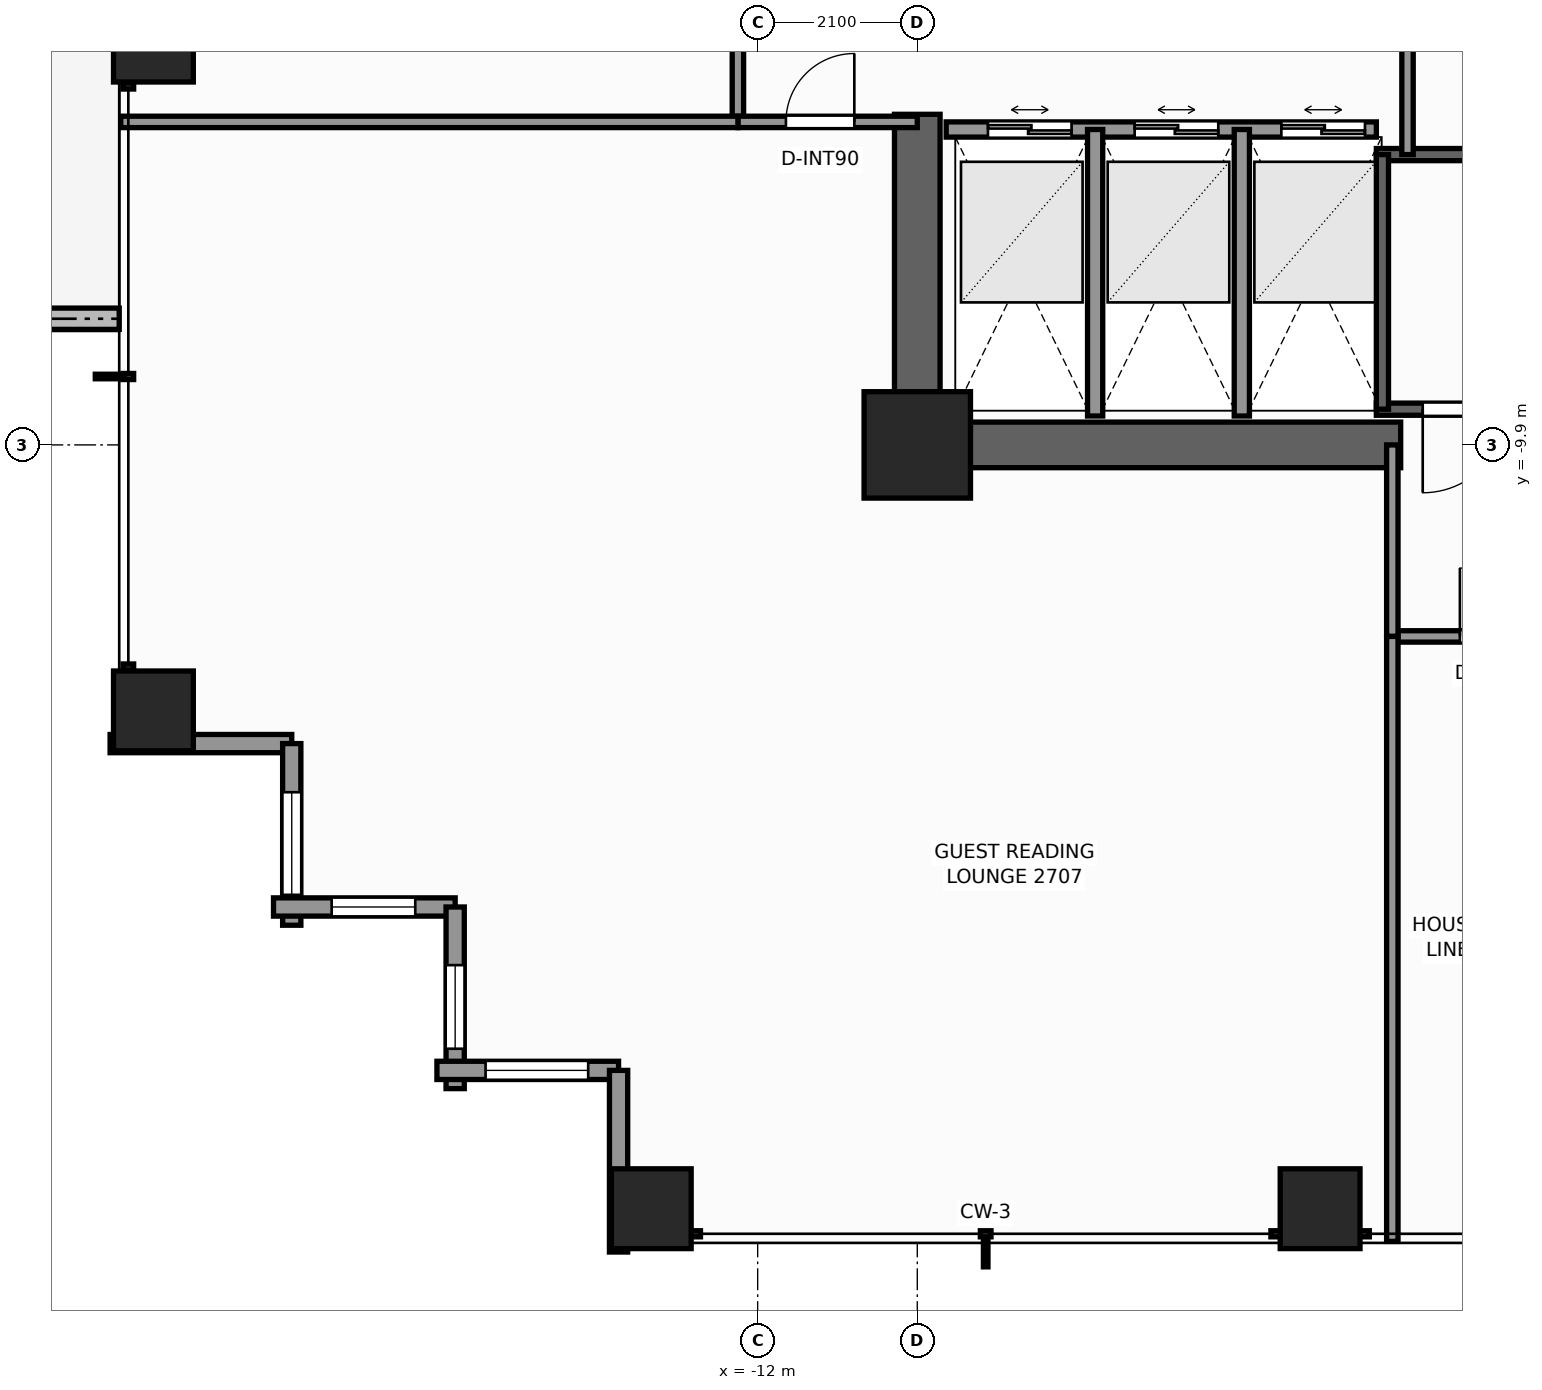
"""IFC4 building model, lengths in metres.
Left out: names, types, materials, properties, quantities, classifications, styles, units other than length and angle.
Written with IfcOpenShell. Run it as: python <this file> out.ifc"""

import sys

from ifc_helpers import new_model, si_unit, direction, frame, frame_2d, origin, origin_2d, place, context, subcontext, project, spatial, rectangle, extrude, element, fill, save


model = new_model("IFC4")
c1 = context("Model", 3, precision=1e-05, world=origin(), true_north=direction((0.0, 1.0)))
c2 = subcontext(c1, "Body", "Model", "MODEL_VIEW")
j1 = project(units=[si_unit("LENGTHUNIT", "METRE"), si_unit("PLANEANGLEUNIT", "RADIAN")], contexts=[c1])
p1 = place(None, origin())
s1 = spatial("IfcSite", under=j1, at=p1, CompositionType="ELEMENT")
p2 = place(p1, origin())
s2 = spatial("IfcBuilding", under=s1, at=p2, CompositionType="ELEMENT")
p3 = place(p2, frame((0.0, 0.0, 95.3)))
s3 = spatial("IfcBuildingStorey", under=s2, at=p3, CompositionType="ELEMENT", Elevation=95.3)
p4 = place(p3, frame((-3.54, -9.9, 0.0), z_axis=(0.0, 0.0, 1.0), x_axis=(-1.0, 0.0, 0.0)))
e1 = element("IfcWall", 1, at=p4, inside=s3, PredefinedType="SHEAR", context=c2, shape_type="SweptSolid", body=[
    extrude(rectangle(XDim=6.66, YDim=0.6, at=frame_2d((3.33, 0.0))), origin(), (0.0, 0.0, 1.0), 3.3),
])
p5 = place(p3, frame((-9.9, -9.6, 0.0), z_axis=(0.0, 0.0, 1.0), x_axis=(0.0, 1.0, 0.0)))
e2 = element("IfcWall", 2, at=p5, inside=s3, PredefinedType="SHEAR", context=c2, shape_type="SweptSolid", body=[
    extrude(rectangle(XDim=4.05, YDim=0.6, at=frame_2d((2.025, 0.0))), origin(), (0.0, 0.0, 1.0), 3.3),
])
p6 = place(p3, frame((-9.9, -9.9, 0.0), z_axis=(0.0, 0.0, 1.0), x_axis=(1.0, 0.0, 0.0)))
e3 = element("IfcColumn", 3, at=p6, inside=s3, PredefinedType="COLUMN", context=c2, shape_type="SweptSolid", body=[
    extrude(rectangle(XDim=1.4, YDim=1.4, at=origin_2d()), origin(), (0.0, 0.0, 1.0), 3.3),
])
for number, where, z_axis, x_axis in (
    (4, (-13.4, -19.95, 0.0), (0.0, 0.0, 1.0), (1.0, 0.0, 0.0)),
    (5, (-4.6, -19.95, 0.0), (0.0, 0.0, 1.0), (1.0, 0.0, 0.0)),
    (6, (-19.95, -13.4, 0.0), (0.0, 0.0, 1.0), (1.0, 0.0, 0.0)),
    (7, (-19.95, -4.6, 0.0), (0.0, 0.0, 1.0), (1.0, 0.0, 0.0)),
):
    element("IfcColumn", number, at=place(p3, frame(where, z_axis=z_axis, x_axis=x_axis)), inside=s3, PredefinedType="COLUMN", context=c2, shape_type="SweptSolid", body=[
        extrude(rectangle(XDim=1.05, YDim=1.05, at=origin_2d()), origin(), (0.0, 0.0, 1.0), 3.3),
    ])
p7 = place(p3, frame((-21.66, -8.24, -0.04), z_axis=(0.0, 0.0, 1.0), x_axis=(1.0, 0.0, 0.0)))
e8 = element("IfcWall", 8, at=p7, inside=s3, PredefinedType="PARAPET", context=c2, shape_type="SweptSolid", body=[
    extrude(rectangle(XDim=1.26, YDim=0.28, at=frame_2d((0.63, 0.0))), origin(), (0.0, 0.0, 1.0), 0.42),
])
p8 = place(p3, frame((-18.13, -13.83, 0.0), z_axis=(0.0, 0.0, 1.0), x_axis=(-1.0, 0.0, 0.0)))
e9 = element("IfcWall", 9, at=p8, inside=s3, PredefinedType="STANDARD", context=c2, shape_type="SweptSolid", body=[
    extrude(rectangle(XDim=2.39, YDim=0.24, at=frame_2d((1.195, 0.0))), origin(), (0.0, 0.0, 1.0), 2.459),
])
p9 = place(p3, frame((-18.13, -16.22, 0.0), z_axis=(0.0, 0.0, 1.0), x_axis=(0.0, 1.0, 0.0)))
e10 = element("IfcWall", 10, at=p9, inside=s3, PredefinedType="STANDARD", context=c2, shape_type="SweptSolid", body=[
    extrude(rectangle(XDim=2.39, YDim=0.24, at=frame_2d((1.195, 0.0))), origin(), (0.0, 0.0, 1.0), 2.459),
])
p10 = place(p9, frame((0.4, 0.0, 0.65)))
e11 = element("IfcOpeningElement", 11, at=p10, cuts=e10, PredefinedType="OPENING", context=c2, shape_type="SweptSolid", body=[
    extrude(rectangle(XDim=1.35, YDim=1.55, at=frame_2d((0.675, 0.775))), frame((0.0, 0.13, 0.0), z_axis=(0.0, -1.0, 0.0), x_axis=(1.0, 0.0, 0.0)), (0.0, 0.0, 1.0), 0.26),
])
p11 = place(p3, frame((-15.98, -15.98, 0.0), z_axis=(0.0, 0.0, 1.0), x_axis=(-1.0, 0.0, 0.0)))
e12 = element("IfcWall", 12, at=p11, inside=s3, PredefinedType="STANDARD", context=c2, shape_type="SweptSolid", body=[
    extrude(rectangle(XDim=2.39, YDim=0.24, at=frame_2d((1.195, 0.0))), origin(), (0.0, 0.0, 1.0), 2.459),
])
p12 = place(p11, frame((0.525, 0.0, 0.65)))
e13 = element("IfcOpeningElement", 13, at=p12, cuts=e12, PredefinedType="OPENING", context=c2, shape_type="SweptSolid", body=[
    extrude(rectangle(XDim=1.1, YDim=1.45, at=frame_2d((0.55, 0.725))), frame((0.0, 0.13, 0.0), z_axis=(0.0, -1.0, 0.0), x_axis=(1.0, 0.0, 0.0)), (0.0, 0.0, 1.0), 0.26),
])
p13 = place(p3, frame((-15.98, -18.37, 0.0), z_axis=(0.0, 0.0, 1.0), x_axis=(0.0, 1.0, 0.0)))
e14 = element("IfcWall", 14, at=p13, inside=s3, PredefinedType="STANDARD", context=c2, shape_type="SweptSolid", body=[
    extrude(rectangle(XDim=2.39, YDim=0.24, at=frame_2d((1.195, 0.0))), origin(), (0.0, 0.0, 1.0), 2.459),
])
p14 = place(p13, frame((0.525, 0.0, 0.65)))
e15 = element("IfcOpeningElement", 15, at=p14, cuts=e14, PredefinedType="OPENING", context=c2, shape_type="SweptSolid", body=[
    extrude(rectangle(XDim=1.1, YDim=1.45, at=frame_2d((0.55, 0.725))), frame((0.0, 0.13, 0.0), z_axis=(0.0, -1.0, 0.0), x_axis=(1.0, 0.0, 0.0)), (0.0, 0.0, 1.0), 0.26),
])
p15 = place(p3, frame((-13.83, -18.13, 0.0), z_axis=(0.0, 0.0, 1.0), x_axis=(-1.0, 0.0, 0.0)))
e16 = element("IfcWall", 16, at=p15, inside=s3, PredefinedType="STANDARD", context=c2, shape_type="SweptSolid", body=[
    extrude(rectangle(XDim=2.39, YDim=0.24, at=frame_2d((1.195, 0.0))), origin(), (0.0, 0.0, 1.0), 2.459),
])
p16 = place(p15, frame((0.4, 0.0, 0.65)))
e17 = element("IfcOpeningElement", 17, at=p16, cuts=e16, PredefinedType="OPENING", context=c2, shape_type="SweptSolid", body=[
    extrude(rectangle(XDim=1.35, YDim=1.55, at=frame_2d((0.675, 0.775))), frame((0.0, 0.13, 0.0), z_axis=(0.0, -1.0, 0.0), x_axis=(1.0, 0.0, 0.0)), (0.0, 0.0, 1.0), 0.26),
])
p17 = place(p3, frame((-13.83, -20.52, 0.0), z_axis=(0.0, 0.0, 1.0), x_axis=(0.0, 1.0, 0.0)))
e18 = element("IfcWall", 18, at=p17, inside=s3, PredefinedType="STANDARD", context=c2, shape_type="SweptSolid", body=[
    extrude(rectangle(XDim=2.39, YDim=0.24, at=frame_2d((1.195, 0.0))), origin(), (0.0, 0.0, 1.0), 2.459),
])
p18 = place(p3, frame((3.86, -9.43, 0.0), z_axis=(0.0, 0.0, 1.0), x_axis=(-1.0, 0.0, 0.0)))
e19 = element("IfcWall", 19, at=p18, inside=s3, PredefinedType="SHEAR", context=c2, shape_type="SweptSolid", body=[
    extrude(rectangle(XDim=7.72, YDim=0.16, at=frame_2d((3.86, 0.0))), origin(), (0.0, 0.0, 1.0), 3.3),
])
p19 = place(p18, frame((6.01, 0.0, 0.0)))
e20 = element("IfcOpeningElement", 20, at=p19, cuts=e19, PredefinedType="OPENING", context=c2, shape_type="SweptSolid", body=[
    extrude(rectangle(XDim=1.1, YDim=2.2, at=frame_2d((0.55, 1.1))), frame((0.0, 0.09, 0.0), z_axis=(0.0, -1.0, 0.0), x_axis=(1.0, 0.0, 0.0)), (0.0, 0.0, 1.0), 0.18),
])
p20 = place(p3, frame((-3.86, -6.08, 0.0), z_axis=(0.0, 0.0, 1.0), x_axis=(1.0, 0.0, 0.0)))
e21 = element("IfcWall", 21, at=p20, inside=s3, PredefinedType="SHEAR", context=c2, shape_type="SweptSolid", body=[
    extrude(rectangle(XDim=7.72, YDim=0.16, at=frame_2d((3.86, 0.0))), origin(), (0.0, 0.0, 1.0), 3.3),
])
p21 = place(p3, frame((-3.78, -9.43, 0.0), z_axis=(0.0, 0.0, 1.0), x_axis=(0.0, 1.0, 0.0)))
e22 = element("IfcWall", 22, at=p21, inside=s3, PredefinedType="SHEAR", context=c2, shape_type="SweptSolid", body=[
    extrude(rectangle(XDim=3.35, YDim=0.16, at=frame_2d((1.675, 0.0))), origin(), (0.0, 0.0, 1.0), 3.3),
])
p22 = place(p3, frame((-9.52, -5.75, 0.0), z_axis=(0.0, 0.0, 1.0), x_axis=(1.0, 0.0, 0.0)))
e23 = element("IfcWall", 23, at=p22, inside=s3, PredefinedType="SOLIDWALL", context=c2, shape_type="SweptSolid", body=[
    extrude(rectangle(XDim=5.66, YDim=0.2, at=frame_2d((2.83, 0.0))), origin(), (0.0, 0.0, 1.0), 3.08),
])
p23 = place(p22, frame((0.55, 0.0, 0.0)))
e24 = element("IfcOpeningElement", 24, at=p23, cuts=e23, PredefinedType="OPENING", context=c2, shape_type="SweptSolid", body=[
    extrude(rectangle(XDim=1.1, YDim=2.2, at=frame_2d((0.55, 1.1))), frame((0.0, 0.11, 0.0), z_axis=(0.0, -1.0, 0.0), x_axis=(1.0, 0.0, 0.0)), (0.0, 0.0, 1.0), 0.22),
])
p24 = place(p22, frame((2.48, 0.0, 0.0)))
e25 = element("IfcOpeningElement", 25, at=p24, cuts=e23, PredefinedType="OPENING", context=c2, shape_type="SweptSolid", body=[
    extrude(rectangle(XDim=1.1, YDim=2.2, at=frame_2d((0.55, 1.1))), frame((0.0, 0.11, 0.0), z_axis=(0.0, -1.0, 0.0), x_axis=(1.0, 0.0, 0.0)), (0.0, 0.0, 1.0), 0.22),
])
p25 = place(p22, frame((4.41, 0.0, 0.0)))
e26 = element("IfcOpeningElement", 26, at=p25, cuts=e23, PredefinedType="OPENING", context=c2, shape_type="SweptSolid", body=[
    extrude(rectangle(XDim=1.1, YDim=2.2, at=frame_2d((0.55, 1.1))), frame((0.0, 0.11, 0.0), z_axis=(0.0, -1.0, 0.0), x_axis=(1.0, 0.0, 0.0)), (0.0, 0.0, 1.0), 0.22),
])
for number, where, z_axis, x_axis in (
    (27, (-7.56, -9.52, 0.0), (0.0, 0.0, 1.0), (0.0, 1.0, 0.0)),
    (28, (-5.63, -9.52, 0.0), (0.0, 0.0, 1.0), (0.0, 1.0, 0.0)),
):
    element("IfcWall", number, at=place(p3, frame(where, z_axis=z_axis, x_axis=x_axis)), inside=s3, PredefinedType="SOLIDWALL", context=c2, shape_type="SweptSolid", body=[
        extrude(rectangle(XDim=3.77, YDim=0.2, at=frame_2d((1.885, 0.0))), origin(), (0.0, 0.0, 1.0), 3.08),
    ])
p26 = place(p3, frame((-3.45, -6.08, 0.0), z_axis=(0.0, 0.0, 1.0), x_axis=(0.0, 1.0, 0.0)))
e29 = element("IfcWall", 29, at=p26, inside=s3, PredefinedType="PARTITIONING", context=c2, shape_type="SweptSolid", body=[
    extrude(rectangle(XDim=2.36, YDim=0.15, at=frame_2d((1.18, 0.0))), origin(), (0.0, 0.0, 1.0), 3.08),
])
p27 = place(p3, frame((-3.65, -12.42, 0.0), z_axis=(0.0, 0.0, 1.0), x_axis=(1.0, 0.0, 0.0)))
e30 = element("IfcWall", 30, at=p27, inside=s3, PredefinedType="PARTITIONING", context=c2, shape_type="SweptSolid", body=[
    extrude(rectangle(XDim=16.07, YDim=0.15, at=frame_2d((8.035, 0.0))), origin(), (0.0, 0.0, 1.0), 2.292),
])
p28 = place(p27, frame((0.889, 0.0, 0.0)))
e31 = element("IfcOpeningElement", 31, at=p28, cuts=e30, PredefinedType="OPENING", context=c2, shape_type="SweptSolid", body=[
    extrude(rectangle(XDim=0.9, YDim=2.06, at=frame_2d((0.45, 1.03))), frame((0.0, 0.085, 0.0), z_axis=(0.0, -1.0, 0.0), x_axis=(1.0, 0.0, 0.0)), (0.0, 0.0, 1.0), 0.17),
])
p29 = place(p27, frame((4.722, 0.0, 0.0)))
e32 = element("IfcOpeningElement", 32, at=p29, cuts=e30, PredefinedType="OPENING", context=c2, shape_type="SweptSolid", body=[
    extrude(rectangle(XDim=0.95, YDim=2.06, at=frame_2d((0.475, 1.03))), frame((0.0, 0.085, 0.0), z_axis=(0.0, -1.0, 0.0), x_axis=(1.0, 0.0, 0.0)), (0.0, 0.0, 1.0), 0.17),
])
p30 = place(p27, frame((9.415, 0.0, 0.0)))
e33 = element("IfcOpeningElement", 33, at=p30, cuts=e30, PredefinedType="OPENING", context=c2, shape_type="SweptSolid", body=[
    extrude(rectangle(XDim=0.9, YDim=2.06, at=frame_2d((0.45, 1.03))), frame((0.0, 0.085, 0.0), z_axis=(0.0, -1.0, 0.0), x_axis=(1.0, 0.0, 0.0)), (0.0, 0.0, 1.0), 0.17),
])
p31 = place(p27, frame((11.313, 0.0, 0.0)))
e34 = element("IfcOpeningElement", 34, at=p31, cuts=e30, PredefinedType="OPENING", context=c2, shape_type="SweptSolid", body=[
    extrude(rectangle(XDim=0.95, YDim=2.06, at=frame_2d((0.475, 1.03))), frame((0.0, 0.085, 0.0), z_axis=(0.0, -1.0, 0.0), x_axis=(1.0, 0.0, 0.0)), (0.0, 0.0, 1.0), 0.17),
])
p32 = place(p3, frame((-3.65, -12.42, 0.0), z_axis=(0.0, 0.0, 1.0), x_axis=(0.0, 1.0, 0.0)))
e35 = element("IfcWall", 35, at=p32, inside=s3, PredefinedType="PARTITIONING", context=c2, shape_type="SweptSolid", body=[
    extrude(rectangle(XDim=2.52, YDim=0.15, at=frame_2d((1.26, 0.0))), origin(), (0.0, 0.0, 1.0), 3.08),
])
p33 = place(p3, frame((-12.26, -5.65, 0.0), z_axis=(0.0, 0.0, 1.0), x_axis=(0.0, 1.0, 0.0)))
e36 = element("IfcWall", 36, at=p33, inside=s3, PredefinedType="PARTITIONING", context=c2, shape_type="SweptSolid", body=[
    extrude(rectangle(XDim=3.6, YDim=0.15, at=frame_2d((1.8, 0.0))), origin(), (0.0, 0.0, 1.0), 2.292),
])
p34 = place(p33, frame((2.156, 0.0, 0.0)))
e37 = element("IfcOpeningElement", 37, at=p34, cuts=e36, PredefinedType="OPENING", context=c2, shape_type="SweptSolid", body=[
    extrude(rectangle(XDim=0.9, YDim=2.06, at=frame_2d((0.45, 1.03))), frame((0.0, 0.085, 0.0), z_axis=(0.0, -1.0, 0.0), x_axis=(1.0, 0.0, 0.0)), (0.0, 0.0, 1.0), 0.17),
])
p35 = place(p3, frame((-12.26, -5.65, 0.0), z_axis=(0.0, 0.0, 1.0), x_axis=(1.0, 0.0, 0.0)))
e38 = element("IfcWall", 38, at=p35, inside=s3, PredefinedType="PARTITIONING", context=c2, shape_type="SweptSolid", body=[
    extrude(rectangle(XDim=2.36, YDim=0.15, at=frame_2d((1.18, 0.0))), origin(), (0.0, 0.0, 1.0), 3.08),
])
p36 = place(p35, frame((0.632, 0.0, 0.0)))
e39 = element("IfcOpeningElement", 39, at=p36, cuts=e38, PredefinedType="OPENING", context=c2, shape_type="SweptSolid", body=[
    extrude(rectangle(XDim=0.9, YDim=2.06, at=frame_2d((0.45, 1.03))), frame((0.0, 0.085, 0.0), z_axis=(0.0, -1.0, 0.0), x_axis=(1.0, 0.0, 0.0)), (0.0, 0.0, 1.0), 0.17),
])
p37 = place(p3, frame((-20.38, -5.65, 0.0), z_axis=(0.0, 0.0, 1.0), x_axis=(1.0, 0.0, 0.0)))
e40 = element("IfcWall", 40, at=p37, inside=s3, PredefinedType="PARTITIONING", context=c2, shape_type="SweptSolid", body=[
    extrude(rectangle(XDim=8.12, YDim=0.15, at=frame_2d((4.06, 0.0))), origin(), (0.0, 0.0, 1.0), 2.449),
])
p38 = place(p3, frame((-3.65, -20.38, 0.0), z_axis=(0.0, 0.0, 1.0), x_axis=(0.0, 1.0, 0.0)))
e41 = element("IfcWall", 41, at=p38, inside=s3, PredefinedType="PARTITIONING", context=c2, shape_type="SweptSolid", body=[
    extrude(rectangle(XDim=7.96, YDim=0.15, at=frame_2d((3.98, 0.0))), origin(), (0.0, 0.0, 1.0), 2.449),
])
p39 = place(p10, origin())
e42 = element("IfcWindow", 42, at=p39, inside=s3, PartitioningType="SINGLE_PANEL", PredefinedType="WINDOW", context=c2, shape_type="SweptSolid", body=[
    extrude(rectangle(XDim=1.35, YDim=1.55, at=frame_2d((0.675, 0.775))), frame((0.0, 0.03, 0.0), z_axis=(0.0, -1.0, 0.0), x_axis=(1.0, 0.0, 0.0)), (0.0, 0.0, 1.0), 0.06),
])
fill(e11, e42)
p40 = place(p12, origin())
e43 = element("IfcWindow", 43, at=p40, inside=s3, PartitioningType="SINGLE_PANEL", PredefinedType="WINDOW", context=c2, shape_type="SweptSolid", body=[
    extrude(rectangle(XDim=1.1, YDim=1.45, at=frame_2d((0.55, 0.725))), frame((0.0, 0.03, 0.0), z_axis=(0.0, -1.0, 0.0), x_axis=(1.0, 0.0, 0.0)), (0.0, 0.0, 1.0), 0.06),
])
fill(e13, e43)
p41 = place(p14, origin())
e44 = element("IfcWindow", 44, at=p41, inside=s3, PartitioningType="SINGLE_PANEL", PredefinedType="WINDOW", context=c2, shape_type="SweptSolid", body=[
    extrude(rectangle(XDim=1.1, YDim=1.45, at=frame_2d((0.55, 0.725))), frame((0.0, 0.03, 0.0), z_axis=(0.0, -1.0, 0.0), x_axis=(1.0, 0.0, 0.0)), (0.0, 0.0, 1.0), 0.06),
])
fill(e15, e44)
p42 = place(p16, origin())
e45 = element("IfcWindow", 45, at=p42, inside=s3, PartitioningType="SINGLE_PANEL", PredefinedType="WINDOW", context=c2, shape_type="SweptSolid", body=[
    extrude(rectangle(XDim=1.35, YDim=1.55, at=frame_2d((0.675, 0.775))), frame((0.0, 0.03, 0.0), z_axis=(0.0, -1.0, 0.0), x_axis=(1.0, 0.0, 0.0)), (0.0, 0.0, 1.0), 0.06),
])
fill(e17, e45)
p43 = place(p19, origin())
e46 = element("IfcDoor", 46, at=p43, inside=s3, OperationType="SINGLE_SWING_RIGHT", PredefinedType="DOOR", context=c2, shape_type="SweptSolid", body=[
    extrude(rectangle(XDim=1.1, YDim=2.2, at=frame_2d((0.55, 1.1))), frame((0.0, 0.025, 0.0), z_axis=(0.0, -1.0, 0.0), x_axis=(1.0, 0.0, 0.0)), (0.0, 0.0, 1.0), 0.05),
])
fill(e20, e46)
p44 = place(p23, origin())
e47 = element("IfcDoor", 47, at=p44, inside=s3, OperationType="DOUBLE_DOOR_SLIDING", PredefinedType="DOOR", context=c2, shape_type="SweptSolid", body=[
    extrude(rectangle(XDim=1.1, YDim=2.2, at=frame_2d((0.55, 1.1))), frame((0.0, 0.025, 0.0), z_axis=(0.0, -1.0, 0.0), x_axis=(1.0, 0.0, 0.0)), (0.0, 0.0, 1.0), 0.05),
])
fill(e24, e47)
p45 = place(p24, origin())
e48 = element("IfcDoor", 48, at=p45, inside=s3, OperationType="DOUBLE_DOOR_SLIDING", PredefinedType="DOOR", context=c2, shape_type="SweptSolid", body=[
    extrude(rectangle(XDim=1.1, YDim=2.2, at=frame_2d((0.55, 1.1))), frame((0.0, 0.025, 0.0), z_axis=(0.0, -1.0, 0.0), x_axis=(1.0, 0.0, 0.0)), (0.0, 0.0, 1.0), 0.05),
])
fill(e25, e48)
p46 = place(p25, origin())
e49 = element("IfcDoor", 49, at=p46, inside=s3, OperationType="DOUBLE_DOOR_SLIDING", PredefinedType="DOOR", context=c2, shape_type="SweptSolid", body=[
    extrude(rectangle(XDim=1.1, YDim=2.2, at=frame_2d((0.55, 1.1))), frame((0.0, 0.025, 0.0), z_axis=(0.0, -1.0, 0.0), x_axis=(1.0, 0.0, 0.0)), (0.0, 0.0, 1.0), 0.05),
])
fill(e26, e49)
p47 = place(p36, origin())
e50 = element("IfcDoor", 50, at=p47, inside=s3, OperationType="SINGLE_SWING_RIGHT", PredefinedType="DOOR", context=c2, shape_type="SweptSolid", body=[
    extrude(rectangle(XDim=0.9, YDim=2.06, at=frame_2d((0.45, 1.03))), frame((0.0, 0.025, 0.0), z_axis=(0.0, -1.0, 0.0), x_axis=(1.0, 0.0, 0.0)), (0.0, 0.0, 1.0), 0.05),
])
fill(e39, e50)
p48 = place(p28, origin())
e51 = element("IfcDoor", 51, at=p48, inside=s3, OperationType="SINGLE_SWING_LEFT", PredefinedType="DOOR", context=c2, shape_type="SweptSolid", body=[
    extrude(rectangle(XDim=0.9, YDim=2.06, at=frame_2d((0.45, 1.03))), frame((0.0, 0.025, 0.0), z_axis=(0.0, -1.0, 0.0), x_axis=(1.0, 0.0, 0.0)), (0.0, 0.0, 1.0), 0.05),
])
fill(e31, e51)
save(model, sys.argv[1])
